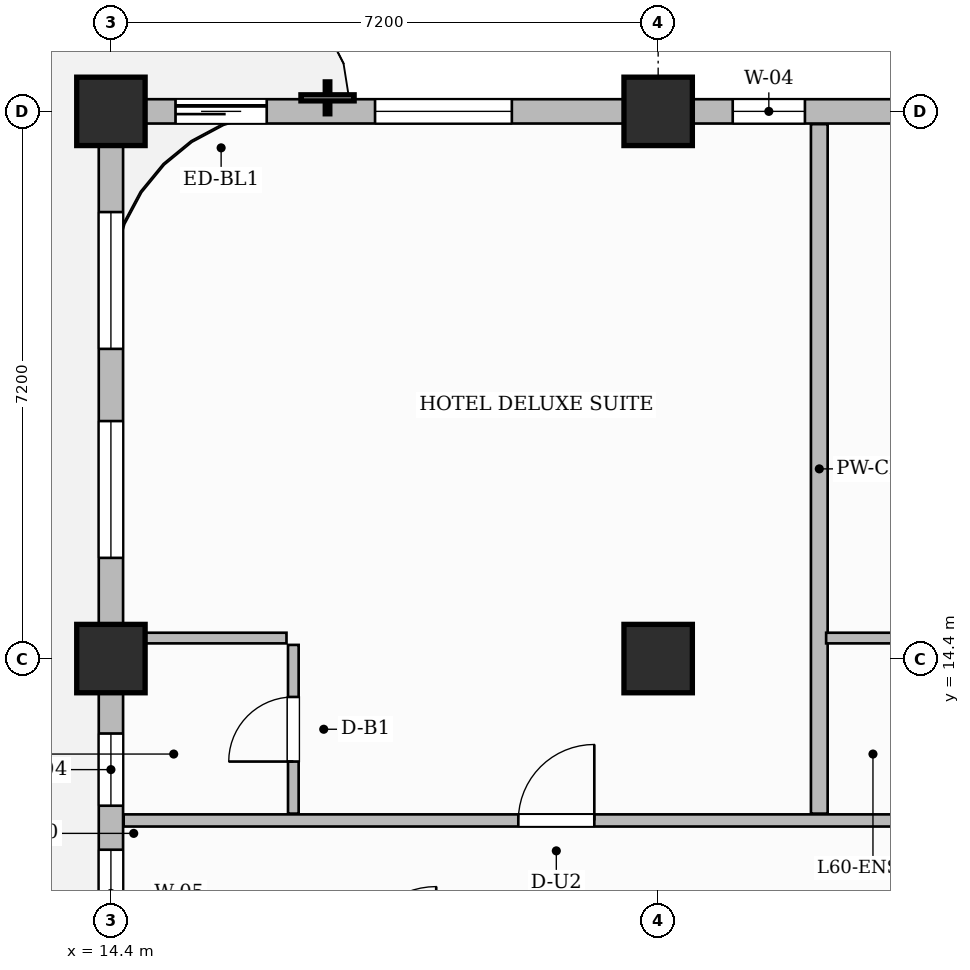
"""IFC4 building model, lengths in metres.
Left out: names, types, materials, properties, quantities, classifications, styles, units other than length and angle.
Written with IfcOpenShell. Run it as: python <this file> out.ifc"""

import sys

from ifc_helpers import new_model, si_unit, direction, frame, frame_2d, origin, origin_2d, place, context, subcontext, project, spatial, rectangle, extrude, source, transform, mapped, element, fill, save


model = new_model("IFC4")
c1 = context("Model", 3, precision=1e-05, world=origin(), true_north=direction((0.0, 1.0)))
c2 = subcontext(c1, "Body", "Model", "MODEL_VIEW")
j1 = project(units=[si_unit("LENGTHUNIT", "METRE"), si_unit("PLANEANGLEUNIT", "RADIAN")], contexts=[c1])
p1 = place(None, origin())
s1 = spatial("IfcSite", under=j1, at=p1, CompositionType="ELEMENT")
p2 = place(p1, origin())
s2 = spatial("IfcBuilding", under=s1, at=p2, CompositionType="ELEMENT")
p3 = place(p2, frame((0.0, 0.0, 240.4)))
s3 = spatial("IfcBuildingStorey", under=s2, at=p3, CompositionType="ELEMENT", Elevation=240.4)
m1 = source(origin(), c2, "Body", "SweptSolid", [
    extrude(rectangle(XDim=0.9, YDim=0.9, at=origin_2d()), origin(), (0.0, 0.0, 1.0), 3.85),
])
for number, where, z_axis, x_axis in (
    (1, (14.4, 14.4, 0.0), (0.0, 0.0, 1.0), (1.0, 0.0, 0.0)),
    (2, (14.4, 21.6, 0.0), (0.0, 0.0, 1.0), (1.0, 0.0, 0.0)),
    (3, (21.6, 14.4, 0.0), (0.0, 0.0, 1.0), (1.0, 0.0, 0.0)),
    (4, (21.6, 21.6, 0.0), (0.0, 0.0, 1.0), (1.0, 0.0, 0.0)),
):
    element("IfcColumn", number, at=place(p3, frame(where, z_axis=z_axis, x_axis=x_axis)), inside=s3, PredefinedType="COLUMN", context=c2, shape_type="MappedRepresentation", body=[
        mapped(m1, transform((0.0, 0.0, 0.0), scale=1.0)),
    ])
p4 = place(p3, frame((14.568, 12.27, 0.0), z_axis=(0.0, 0.0, 1.0), x_axis=(1.0, 0.0, 0.0)))
e5 = element("IfcWall", 5, at=p4, inside=s3, PredefinedType="PARTITIONING", context=c2, shape_type="SweptSolid", body=[
    extrude(rectangle(XDim=15.542, YDim=0.16, at=frame_2d((7.771, 0.0))), origin(), (0.0, 0.0, 1.0), 3.6),
])
p5 = place(p4, frame((5.192, 0.0, 0.0)))
e6 = element("IfcOpeningElement", 6, at=p5, cuts=e5, PredefinedType="OPENING", context=c2, shape_type="SweptSolid", body=[
    extrude(rectangle(XDim=1.0, YDim=2.2, at=frame_2d((0.5, 1.1))), frame((0.0, 0.09, 0.0), z_axis=(0.0, -1.0, 0.0), x_axis=(1.0, 0.0, 0.0)), (0.0, 0.0, 1.0), 0.18),
])
p6 = place(p4, frame((13.017, 0.0, 0.0)))
e7 = element("IfcOpeningElement", 7, at=p6, cuts=e5, PredefinedType="OPENING", context=c2, shape_type="SweptSolid", body=[
    extrude(rectangle(XDim=1.05, YDim=2.25, at=frame_2d((0.525, 1.125))), frame((0.0, 0.09, 0.0), z_axis=(0.0, -1.0, 0.0), x_axis=(1.0, 0.0, 0.0)), (0.0, 0.0, 1.0), 0.18),
])
p7 = place(p3, frame((23.72, 12.36, 0.0), z_axis=(0.0, 0.0, 1.0), x_axis=(0.0, 1.0, 0.0)))
e8 = element("IfcWall", 8, at=p7, inside=s3, PredefinedType="PARTITIONING", context=c2, shape_type="SweptSolid", body=[
    extrude(rectangle(XDim=9.072, YDim=0.22, at=frame_2d((4.536, 0.0))), origin(), (0.0, 0.0, 1.0), 3.6),
])
p8 = place(p3, frame((16.8, 12.36, 0.0), z_axis=(0.0, 0.0, 1.0), x_axis=(0.0, 1.0, 0.0)))
e9 = element("IfcWall", 9, at=p8, inside=s3, PredefinedType="PARTITIONING", context=c2, shape_type="SweptSolid", body=[
    extrude(rectangle(XDim=2.22, YDim=0.14, at=frame_2d((1.11, 0.0))), origin(), (0.0, 0.0, 1.0), 3.6),
])
p9 = place(p8, frame((0.685, 0.0, 0.0)))
e10 = element("IfcOpeningElement", 10, at=p9, cuts=e9, PredefinedType="OPENING", context=c2, shape_type="SweptSolid", body=[
    extrude(rectangle(XDim=0.85, YDim=2.1, at=frame_2d((0.425, 1.05))), frame((0.0, 0.08, 0.0), z_axis=(0.0, -1.0, 0.0), x_axis=(1.0, 0.0, 0.0)), (0.0, 0.0, 1.0), 0.16),
])
for number, where, z_axis, x_axis in (
    (11, (14.59, 14.67, 0.0), (0.0, 0.0, 1.0), (1.0, 0.0, 0.0)),
    (12, (23.81, 14.67, 0.0), (0.0, 0.0, 1.0), (1.0, 0.0, 0.0)),
):
    element("IfcWall", number, at=place(p3, frame(where, z_axis=z_axis, x_axis=x_axis)), inside=s3, PredefinedType="PARTITIONING", context=c2, shape_type="SweptSolid", body=[
        extrude(rectangle(XDim=2.12, YDim=0.14, at=frame_2d((1.06, 0.0))), origin(), (0.0, 0.0, 1.0), 3.135),
    ])
p10 = place(p3, frame((14.4, 21.6, 0.0), z_axis=(0.0, 0.0, 1.0), x_axis=(1.0, 0.0, 0.0)))
e13 = element("IfcWall", 13, at=p10, inside=s3, PredefinedType="SOLIDWALL", context=c2, shape_type="SweptSolid", body=[
    extrude(rectangle(XDim=35.4, YDim=0.32, at=frame_2d((17.7, 0.0))), origin(), (0.0, 0.0, 1.0), 3.135),
])
p11 = place(p10, frame((0.85, 0.0, 0.0)))
e14 = element("IfcOpeningElement", 14, at=p11, cuts=e13, PredefinedType="OPENING", context=c2, shape_type="SweptSolid", body=[
    extrude(rectangle(XDim=1.2, YDim=2.2, at=frame_2d((0.6, 1.1))), frame((0.0, 0.17, 0.0), z_axis=(0.0, -1.0, 0.0), x_axis=(1.0, 0.0, 0.0)), (0.0, 0.0, 1.0), 0.34),
])
p12 = place(p10, frame((3.475, 0.0, 0.8)))
e15 = element("IfcOpeningElement", 15, at=p12, cuts=e13, PredefinedType="OPENING", context=c2, shape_type="SweptSolid", body=[
    extrude(rectangle(XDim=1.8, YDim=1.85, at=frame_2d((0.9, 0.925))), frame((0.0, 0.17, 0.0), z_axis=(0.0, -1.0, 0.0), x_axis=(1.0, 0.0, 0.0)), (0.0, 0.0, 1.0), 0.34),
])
p13 = place(p10, frame((8.181, 0.0, 0.8)))
e16 = element("IfcOpeningElement", 16, at=p13, cuts=e13, PredefinedType="OPENING", context=c2, shape_type="SweptSolid", body=[
    extrude(rectangle(XDim=0.95, YDim=1.75, at=frame_2d((0.475, 0.875))), frame((0.0, 0.17, 0.0), z_axis=(0.0, -1.0, 0.0), x_axis=(1.0, 0.0, 0.0)), (0.0, 0.0, 1.0), 0.34),
])
p14 = place(p10, frame((10.564, 0.0, 0.8)))
e17 = element("IfcOpeningElement", 17, at=p14, cuts=e13, PredefinedType="OPENING", context=c2, shape_type="SweptSolid", body=[
    extrude(rectangle(XDim=1.8, YDim=1.85, at=frame_2d((0.9, 0.925))), frame((0.0, 0.17, 0.0), z_axis=(0.0, -1.0, 0.0), x_axis=(1.0, 0.0, 0.0)), (0.0, 0.0, 1.0), 0.34),
])
p15 = place(p10, frame((16.651, 0.0, 0.8)))
e18 = element("IfcOpeningElement", 18, at=p15, cuts=e13, PredefinedType="OPENING", context=c2, shape_type="SweptSolid", body=[
    extrude(rectangle(XDim=1.8, YDim=1.85, at=frame_2d((0.9, 0.925))), frame((0.0, 0.17, 0.0), z_axis=(0.0, -1.0, 0.0), x_axis=(1.0, 0.0, 0.0)), (0.0, 0.0, 1.0), 0.34),
])
p16 = place(p10, frame((21.725, 0.0, 0.8)))
e19 = element("IfcOpeningElement", 19, at=p16, cuts=e13, PredefinedType="OPENING", context=c2, shape_type="SweptSolid", body=[
    extrude(rectangle(XDim=1.8, YDim=1.85, at=frame_2d((0.9, 0.925))), frame((0.0, 0.17, 0.0), z_axis=(0.0, -1.0, 0.0), x_axis=(1.0, 0.0, 0.0)), (0.0, 0.0, 1.0), 0.34),
])
p17 = place(p10, frame((24.475, 0.0, 0.8)))
e20 = element("IfcOpeningElement", 20, at=p17, cuts=e13, PredefinedType="OPENING", context=c2, shape_type="SweptSolid", body=[
    extrude(rectangle(XDim=1.8, YDim=1.85, at=frame_2d((0.9, 0.925))), frame((0.0, 0.17, 0.0), z_axis=(0.0, -1.0, 0.0), x_axis=(1.0, 0.0, 0.0)), (0.0, 0.0, 1.0), 0.34),
])
p18 = place(p10, frame((29.531, 0.0, 0.8)))
e21 = element("IfcOpeningElement", 21, at=p18, cuts=e13, PredefinedType="OPENING", context=c2, shape_type="SweptSolid", body=[
    extrude(rectangle(XDim=1.8, YDim=1.85, at=frame_2d((0.9, 0.925))), frame((0.0, 0.17, 0.0), z_axis=(0.0, -1.0, 0.0), x_axis=(1.0, 0.0, 0.0)), (0.0, 0.0, 1.0), 0.34),
])
p19 = place(p10, frame((32.277, 0.0, 0.8)))
e22 = element("IfcOpeningElement", 22, at=p19, cuts=e13, PredefinedType="OPENING", context=c2, shape_type="SweptSolid", body=[
    extrude(rectangle(XDim=1.8, YDim=1.85, at=frame_2d((0.9, 0.925))), frame((0.0, 0.17, 0.0), z_axis=(0.0, -1.0, 0.0), x_axis=(1.0, 0.0, 0.0)), (0.0, 0.0, 1.0), 0.34),
])
p20 = place(p3, frame((14.4, 0.05, 0.0), z_axis=(0.0, 0.0, 1.0), x_axis=(0.0, 1.0, 0.0)))
e23 = element("IfcWall", 23, at=p20, inside=s3, PredefinedType="SOLIDWALL", context=c2, shape_type="SweptSolid", body=[
    extrude(rectangle(XDim=21.5, YDim=0.32, at=frame_2d((10.75, 0.0))), origin(), (0.0, 0.0, 1.0), 3.135),
])
p21 = place(p20, frame((2.121, 0.0, 0.8)))
e24 = element("IfcOpeningElement", 24, at=p21, cuts=e23, PredefinedType="OPENING", context=c2, shape_type="SweptSolid", body=[
    extrude(rectangle(XDim=1.8, YDim=1.85, at=frame_2d((0.9, 0.925))), frame((0.0, 0.17, 0.0), z_axis=(0.0, -1.0, 0.0), x_axis=(1.0, 0.0, 0.0)), (0.0, 0.0, 1.0), 0.34),
])
p22 = place(p20, frame((8.425, 0.0, 0.8)))
e25 = element("IfcOpeningElement", 25, at=p22, cuts=e23, PredefinedType="OPENING", context=c2, shape_type="SweptSolid", body=[
    extrude(rectangle(XDim=1.4, YDim=1.85, at=frame_2d((0.7, 0.925))), frame((0.0, 0.17, 0.0), z_axis=(0.0, -1.0, 0.0), x_axis=(1.0, 0.0, 0.0)), (0.0, 0.0, 1.0), 0.34),
])
p23 = place(p20, frame((10.685, 0.0, 0.8)))
e26 = element("IfcOpeningElement", 26, at=p23, cuts=e23, PredefinedType="OPENING", context=c2, shape_type="SweptSolid", body=[
    extrude(rectangle(XDim=1.15, YDim=1.8, at=frame_2d((0.575, 0.9))), frame((0.0, 0.17, 0.0), z_axis=(0.0, -1.0, 0.0), x_axis=(1.0, 0.0, 0.0)), (0.0, 0.0, 1.0), 0.34),
])
p24 = place(p20, frame((12.414, 0.0, 0.8)))
e27 = element("IfcOpeningElement", 27, at=p24, cuts=e23, PredefinedType="OPENING", context=c2, shape_type="SweptSolid", body=[
    extrude(rectangle(XDim=0.95, YDim=1.75, at=frame_2d((0.475, 0.875))), frame((0.0, 0.17, 0.0), z_axis=(0.0, -1.0, 0.0), x_axis=(1.0, 0.0, 0.0)), (0.0, 0.0, 1.0), 0.34),
])
p25 = place(p20, frame((15.675, 0.0, 0.8)))
e28 = element("IfcOpeningElement", 28, at=p25, cuts=e23, PredefinedType="OPENING", context=c2, shape_type="SweptSolid", body=[
    extrude(rectangle(XDim=1.8, YDim=1.85, at=frame_2d((0.9, 0.925))), frame((0.0, 0.17, 0.0), z_axis=(0.0, -1.0, 0.0), x_axis=(1.0, 0.0, 0.0)), (0.0, 0.0, 1.0), 0.34),
])
p26 = place(p20, frame((18.425, 0.0, 0.8)))
e29 = element("IfcOpeningElement", 29, at=p26, cuts=e23, PredefinedType="OPENING", context=c2, shape_type="SweptSolid", body=[
    extrude(rectangle(XDim=1.8, YDim=1.85, at=frame_2d((0.9, 0.925))), frame((0.0, 0.17, 0.0), z_axis=(0.0, -1.0, 0.0), x_axis=(1.0, 0.0, 0.0)), (0.0, 0.0, 1.0), 0.34),
])
m2 = source(origin(), c2, "Body", "SweptSolid", [
    extrude(rectangle(XDim=0.85, YDim=2.1, at=frame_2d((0.425, 1.05))), frame((0.0, 0.025, 0.0), z_axis=(0.0, -1.0, 0.0), x_axis=(1.0, 0.0, 0.0)), (0.0, 0.0, 1.0), 0.05),
])
p27 = place(p9, origin())
e30 = element("IfcDoor", 30, at=p27, inside=s3, OperationType="SINGLE_SWING_LEFT", PredefinedType="DOOR", context=c2, shape_type="MappedRepresentation", body=[
    mapped(m2, transform((0.0, 0.0, 0.0), scale=1.0)),
])
fill(e10, e30)
m3 = source(origin(), c2, "Body", "SweptSolid", [
    extrude(rectangle(XDim=1.0, YDim=2.2, at=frame_2d((0.5, 1.1))), frame((0.0, 0.025, 0.0), z_axis=(0.0, -1.0, 0.0), x_axis=(1.0, 0.0, 0.0)), (0.0, 0.0, 1.0), 0.05),
])
p28 = place(p5, origin())
e31 = element("IfcDoor", 31, at=p28, inside=s3, OperationType="SINGLE_SWING_RIGHT", PredefinedType="DOOR", context=c2, shape_type="MappedRepresentation", body=[
    mapped(m3, transform((0.0, 0.0, 0.0), scale=1.0)),
])
fill(e6, e31)
m4 = source(origin(), c2, "Body", "SweptSolid", [
    extrude(rectangle(XDim=1.2, YDim=2.2, at=frame_2d((0.6, 1.1))), frame((0.0, 0.025, 0.0), z_axis=(0.0, -1.0, 0.0), x_axis=(1.0, 0.0, 0.0)), (0.0, 0.0, 1.0), 0.05),
])
p29 = place(p11, origin())
e32 = element("IfcDoor", 32, at=p29, inside=s3, OperationType="SLIDING_TO_LEFT", PredefinedType="DOOR", context=c2, shape_type="MappedRepresentation", body=[
    mapped(m4, transform((0.0, 0.0, 0.0), scale=1.0)),
])
fill(e14, e32)
m5 = source(origin(), c2, "Body", "SweptSolid", [
    extrude(rectangle(XDim=1.8, YDim=1.85, at=frame_2d((0.9, 0.925))), frame((0.0, 0.03, 0.0), z_axis=(0.0, -1.0, 0.0), x_axis=(1.0, 0.0, 0.0)), (0.0, 0.0, 1.0), 0.06),
])
p30 = place(p12, origin())
e33 = element("IfcWindow", 33, at=p30, inside=s3, PartitioningType="DOUBLE_PANEL_VERTICAL", PredefinedType="WINDOW", context=c2, shape_type="MappedRepresentation", body=[
    mapped(m5, transform((0.0, 0.0, 0.0), scale=1.0)),
])
fill(e15, e33)
m6 = source(origin(), c2, "Body", "SweptSolid", [
    extrude(rectangle(XDim=0.95, YDim=1.75, at=frame_2d((0.475, 0.875))), frame((0.0, 0.03, 0.0), z_axis=(0.0, -1.0, 0.0), x_axis=(1.0, 0.0, 0.0)), (0.0, 0.0, 1.0), 0.06),
])
p31 = place(p13, origin())
e34 = element("IfcWindow", 34, at=p31, inside=s3, PartitioningType="SINGLE_PANEL", PredefinedType="WINDOW", context=c2, shape_type="MappedRepresentation", body=[
    mapped(m6, transform((0.0, 0.0, 0.0), scale=1.0)),
])
fill(e16, e34)
m7 = source(origin(), c2, "Body", "SweptSolid", [
    extrude(rectangle(XDim=1.15, YDim=1.8, at=frame_2d((0.575, 0.9))), frame((0.0, 0.03, 0.0), z_axis=(0.0, -1.0, 0.0), x_axis=(1.0, 0.0, 0.0)), (0.0, 0.0, 1.0), 0.06),
])
p32 = place(p23, origin())
e35 = element("IfcWindow", 35, at=p32, inside=s3, PartitioningType="SINGLE_PANEL", PredefinedType="WINDOW", context=c2, shape_type="MappedRepresentation", body=[
    mapped(m7, transform((0.0, 0.0, 0.0), scale=1.0)),
])
fill(e26, e35)
p33 = place(p24, origin())
e36 = element("IfcWindow", 36, at=p33, inside=s3, PartitioningType="SINGLE_PANEL", PredefinedType="WINDOW", context=c2, shape_type="MappedRepresentation", body=[
    mapped(m6, transform((0.0, 0.0, 0.0), scale=1.0)),
])
fill(e27, e36)
p34 = place(p25, origin())
e37 = element("IfcWindow", 37, at=p34, inside=s3, PartitioningType="DOUBLE_PANEL_VERTICAL", PredefinedType="WINDOW", context=c2, shape_type="MappedRepresentation", body=[
    mapped(m5, transform((0.0, 0.0, 0.0), scale=1.0)),
])
fill(e28, e37)
p35 = place(p26, origin())
e38 = element("IfcWindow", 38, at=p35, inside=s3, PartitioningType="DOUBLE_PANEL_VERTICAL", PredefinedType="WINDOW", context=c2, shape_type="MappedRepresentation", body=[
    mapped(m5, transform((0.0, 0.0, 0.0), scale=1.0)),
])
fill(e29, e38)
save(model, sys.argv[1])
